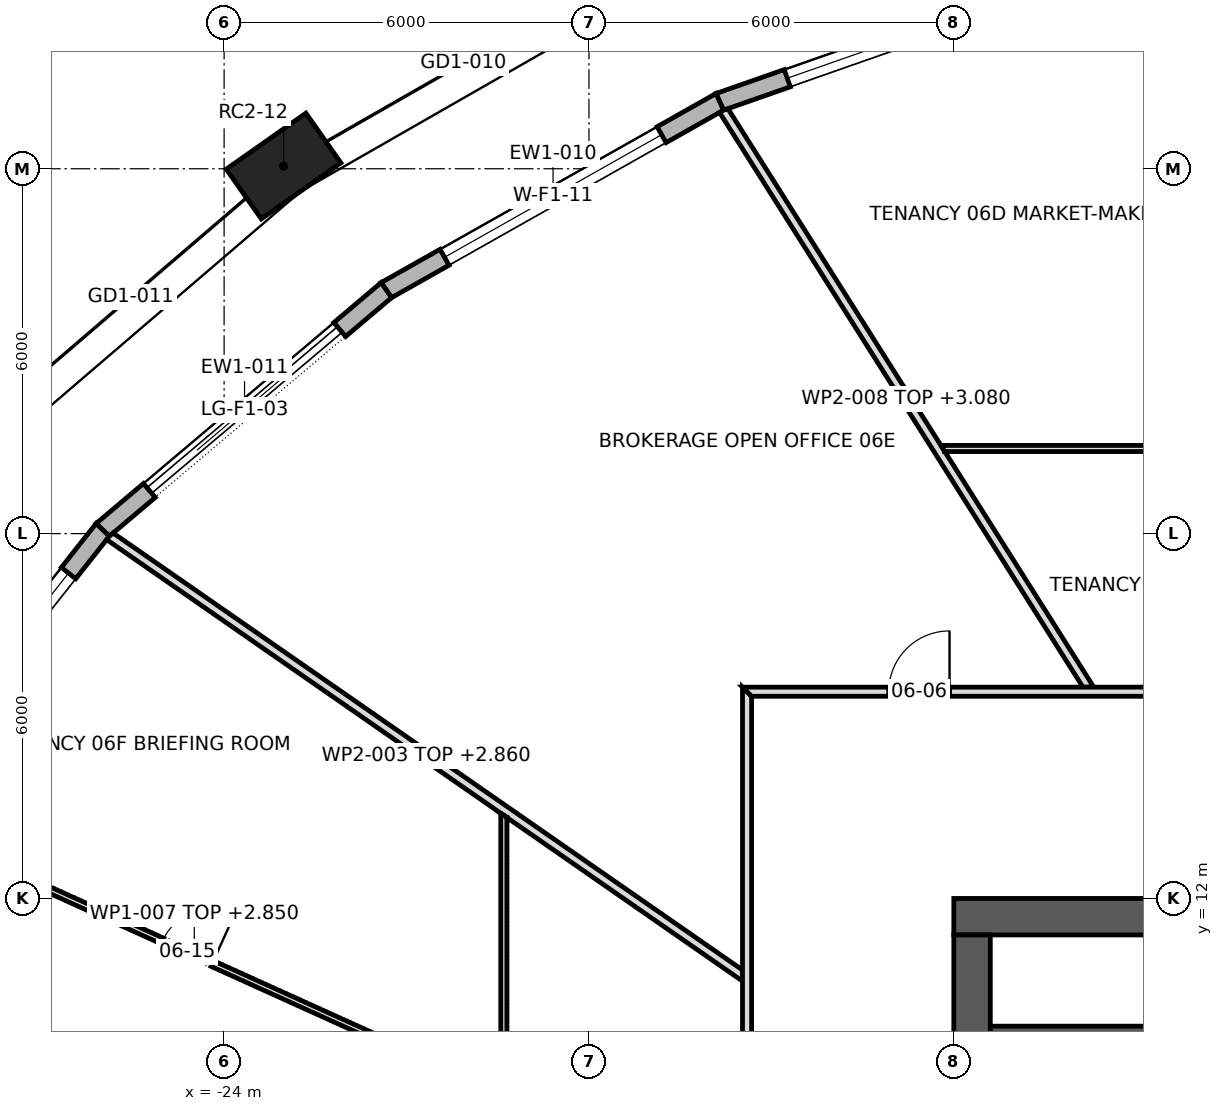
"""IFC4 building model, lengths in metres.
Left out: names, types, materials, properties, quantities, classifications, styles, units other than length and angle.
Written with IfcOpenShell. Run it as: python <this file> out.ifc"""

import sys

from ifc_helpers import new_model, si_unit, direction, frame, frame_2d, origin, origin_2d, place, context, subcontext, project, spatial, polyline, rectangle, outline, extrude, element, fill, save


model = new_model("IFC4")
c1 = context("Model", 3, precision=1e-05, world=origin(), true_north=direction((0.0, 1.0)))
c2 = subcontext(c1, "Body", "Model", "MODEL_VIEW")
j1 = project(units=[si_unit("LENGTHUNIT", "METRE"), si_unit("PLANEANGLEUNIT", "RADIAN")], contexts=[c1])
p1 = place(None, origin())
s1 = spatial("IfcSite", under=j1, at=p1, CompositionType="ELEMENT")
p2 = place(p1, origin())
s2 = spatial("IfcBuilding", under=s1, at=p2, CompositionType="ELEMENT")
p3 = place(p2, frame((0.0, 0.0, 86.5)))
s3 = spatial("IfcBuildingStorey", under=s2, at=p3, CompositionType="ELEMENT", Elevation=86.5)
p4 = place(p3, frame((-23.022, 24.045, 0.0), z_axis=(0.0, 0.0, 1.0), x_axis=(-0.817908788019, -0.57534790734, 0.0)))
e1 = element("IfcColumn", 1, at=p4, inside=s3, PredefinedType="COLUMN", context=c2, shape_type="SweptSolid", body=[
    extrude(rectangle(XDim=1.6, YDim=1.0, at=origin_2d()), origin(), (0.0, 0.0, 1.0), 4.2),
])
p5 = place(p3, frame((-12.0, 11.7, 0.0), z_axis=(0.0, 0.0, 1.0), x_axis=(1.0, 0.0, 0.0)))
e2 = element("IfcWall", 2, at=p5, inside=s3, PredefinedType="SHEAR", context=c2, shape_type="SweptSolid", body=[
    extrude(rectangle(XDim=24.0, YDim=0.6, at=frame_2d((12.0, 0.0))), origin(), (0.0, 0.0, 1.0), 4.2),
])
p6 = place(p5, frame((9.225, 0.0, 0.0)))
e3 = element("IfcOpeningElement", 3, at=p6, cuts=e2, PredefinedType="OPENING", context=c2, shape_type="SweptSolid", body=[
    extrude(rectangle(XDim=0.9, YDim=2.1, at=frame_2d((0.45, 1.05))), frame((0.0, 0.312, 0.0), z_axis=(0.0, -1.0, 0.0), x_axis=(1.0, 0.0, 0.0)), (0.0, 0.0, 1.0), 0.624),
])
p7 = place(p5, frame((10.925, 0.0, 0.0)))
e4 = element("IfcOpeningElement", 4, at=p7, cuts=e2, PredefinedType="OPENING", context=c2, shape_type="SweptSolid", body=[
    extrude(rectangle(XDim=0.8, YDim=2.1, at=frame_2d((0.4, 1.05))), frame((0.0, 0.312, 0.0), z_axis=(0.0, -1.0, 0.0), x_axis=(1.0, 0.0, 0.0)), (0.0, 0.0, 1.0), 0.624),
])
p8 = place(p5, frame((4.2, 0.0, 0.0)))
e5 = element("IfcOpeningElement", 5, at=p8, cuts=e2, PredefinedType="OPENING", context=c2, shape_type="SweptSolid", body=[
    extrude(rectangle(XDim=0.8, YDim=2.1, at=frame_2d((0.4, 1.05))), frame((0.0, 0.312, 0.0), z_axis=(0.0, -1.0, 0.0), x_axis=(1.0, 0.0, 0.0)), (0.0, 0.0, 1.0), 0.624),
])
p9 = place(p5, frame((13.8, 0.0, 0.0)))
e6 = element("IfcOpeningElement", 6, at=p9, cuts=e2, PredefinedType="OPENING", context=c2, shape_type="SweptSolid", body=[
    extrude(rectangle(XDim=0.8, YDim=2.1, at=frame_2d((0.4, 1.05))), frame((0.0, 0.312, 0.0), z_axis=(0.0, -1.0, 0.0), x_axis=(1.0, 0.0, 0.0)), (0.0, 0.0, 1.0), 0.624),
])
p10 = place(p5, frame((16.6, 0.0, 0.0)))
e7 = element("IfcOpeningElement", 7, at=p10, cuts=e2, PredefinedType="OPENING", context=c2, shape_type="SweptSolid", body=[
    extrude(rectangle(XDim=0.8, YDim=2.1, at=frame_2d((0.4, 1.05))), frame((0.0, 0.312, 0.0), z_axis=(0.0, -1.0, 0.0), x_axis=(1.0, 0.0, 0.0)), (0.0, 0.0, 1.0), 0.624),
])
p11 = place(p3, frame((-11.7, -11.4, 0.0), z_axis=(0.0, 0.0, 1.0), x_axis=(0.0, 1.0, 0.0)))
e8 = element("IfcWall", 8, at=p11, inside=s3, PredefinedType="SHEAR", context=c2, shape_type="SweptSolid", body=[
    extrude(rectangle(XDim=22.8, YDim=0.6, at=frame_2d((11.4, 0.0))), origin(), (0.0, 0.0, 1.0), 4.2),
])
p12 = place(p11, frame((10.2, 0.0, 0.0)))
e9 = element("IfcOpeningElement", 9, at=p12, cuts=e8, PredefinedType="OPENING", context=c2, shape_type="SweptSolid", body=[
    extrude(rectangle(XDim=2.4, YDim=2.1, at=frame_2d((1.2, 1.05))), frame((0.0, 0.312, 0.0), z_axis=(0.0, -1.0, 0.0), x_axis=(1.0, 0.0, 0.0)), (0.0, 0.0, 1.0), 0.624),
])
p13 = place(p11, frame((18.925, 0.0, 0.0)))
e10 = element("IfcOpeningElement", 10, at=p13, cuts=e8, PredefinedType="OPENING", context=c2, shape_type="SweptSolid", body=[
    extrude(rectangle(XDim=1.2, YDim=2.1, at=frame_2d((0.6, 1.05))), frame((0.0, 0.312, 0.0), z_axis=(0.0, -1.0, 0.0), x_axis=(1.0, 0.0, 0.0)), (0.0, 0.0, 1.0), 0.624),
])
p14 = place(p11, frame((2.675, 0.0, 0.0)))
e11 = element("IfcOpeningElement", 11, at=p14, cuts=e8, PredefinedType="OPENING", context=c2, shape_type="SweptSolid", body=[
    extrude(rectangle(XDim=1.2, YDim=2.1, at=frame_2d((0.6, 1.05))), frame((0.0, 0.312, 0.0), z_axis=(0.0, -1.0, 0.0), x_axis=(1.0, 0.0, 0.0)), (0.0, 0.0, 1.0), 0.624),
])
p15 = place(p3, frame((-9.759, 27.232, 0.0), z_axis=(0.0, 0.0, 1.0), x_axis=(-0.943820008365, -0.330459970057, 0.0)))
e12 = element("IfcWall", 12, at=p15, inside=s3, PredefinedType="STANDARD", context=c2, shape_type="SweptSolid", body=[
    extrude(outline(polyline([(-0.013, -0.15), (6.466, -0.15), (6.439, 0.15), (0.013, 0.15), (-0.013, -0.15)])), origin(), (0.0, 0.0, 1.0), 3.9),
])
p16 = place(p15, frame((1.176, 0.0, 0.6)))
e13 = element("IfcOpeningElement", 13, at=p16, cuts=e12, PredefinedType="OPENING", context=c2, shape_type="SweptSolid", body=[
    extrude(rectangle(XDim=4.1, YDim=2.85, at=frame_2d((2.05, 1.425))), frame((0.0, 0.162, 0.0), z_axis=(0.0, -1.0, 0.0), x_axis=(1.0, 0.0, 0.0)), (0.0, 0.0, 1.0), 0.324),
])
p17 = place(p3, frame((-15.849, 25.1, 0.0), z_axis=(0.0, 0.0, 1.0), x_axis=(-0.870737550302, -0.491748023376, 0.0)))
e14 = element("IfcWall", 14, at=p17, inside=s3, PredefinedType="STANDARD", context=c2, shape_type="SweptSolid", body=[
    extrude(outline(polyline([(-0.013, -0.15), (6.311, -0.15), (6.282, 0.15), (0.013, 0.15), (-0.013, -0.15)])), origin(), (0.0, 0.0, 1.0), 3.9),
])
p18 = place(p17, frame((1.098, 0.0, 0.6)))
e15 = element("IfcOpeningElement", 15, at=p18, cuts=e14, PredefinedType="OPENING", context=c2, shape_type="SweptSolid", body=[
    extrude(rectangle(XDim=4.1, YDim=2.85, at=frame_2d((2.05, 1.425))), frame((0.0, 0.162, 0.0), z_axis=(0.0, -1.0, 0.0), x_axis=(1.0, 0.0, 0.0)), (0.0, 0.0, 1.0), 0.324),
])
p19 = place(p3, frame((-21.332, 22.004, 0.0), z_axis=(0.0, 0.0, 1.0), x_axis=(-0.763753100684, -0.645508482667, 0.0)))
e16 = element("IfcWall", 16, at=p19, inside=s3, PredefinedType="STANDARD", context=c2, shape_type="SweptSolid", body=[
    extrude(outline(polyline([(-0.014, -0.15), (6.123, -0.15), (6.092, 0.15), (0.014, 0.15), (-0.014, -0.15)])), origin(), (0.0, 0.0, 1.0), 3.9),
])
p20 = place(p19, frame((1.004, 0.0, 0.0)))
e17 = element("IfcOpeningElement", 17, at=p20, cuts=e16, PredefinedType="OPENING", context=c2, shape_type="SweptSolid", body=[
    extrude(rectangle(XDim=4.1, YDim=3.45, at=frame_2d((2.05, 1.725))), frame((0.0, 0.162, 0.0), z_axis=(0.0, -1.0, 0.0), x_axis=(1.0, 0.0, 0.0)), (0.0, 0.0, 1.0), 0.324),
])
p21 = place(p3, frame((-25.996, 18.062, 0.0), z_axis=(0.0, 0.0, 1.0), x_axis=(-0.620142219764, -0.784489405452, 0.0)))
e18 = element("IfcWall", 18, at=p21, inside=s3, PredefinedType="STANDARD", context=c2, shape_type="SweptSolid", body=[
    extrude(outline(polyline([(-0.015, -0.15), (5.928, -0.15), (5.896, 0.15), (0.015, 0.15), (-0.015, -0.15)])), origin(), (0.0, 0.0, 1.0), 3.9),
])
p22 = place(p21, frame((0.906, 0.0, 0.6)))
e19 = element("IfcOpeningElement", 19, at=p22, cuts=e18, PredefinedType="OPENING", context=c2, shape_type="SweptSolid", body=[
    extrude(rectangle(XDim=4.1, YDim=2.85, at=frame_2d((2.05, 1.425))), frame((0.0, 0.162, 0.0), z_axis=(0.0, -1.0, 0.0), x_axis=(1.0, 0.0, 0.0)), (0.0, 0.0, 1.0), 0.324),
])
p23 = place(p3, frame((-11.4, 9.825, 0.0), z_axis=(0.0, 0.0, 1.0), x_axis=(1.0, 0.0, 0.0)))
e20 = element("IfcWall", 20, at=p23, inside=s3, PredefinedType="SHEAR", context=c2, shape_type="SweptSolid", body=[
    extrude(rectangle(XDim=8.0, YDim=0.15, at=frame_2d((4.0, 0.0))), origin(), (0.0, 0.0, 1.0), 3.9),
])
p24 = place(p3, frame((-25.888, 17.962, 0.0), z_axis=(0.0, 0.0, 1.0), x_axis=(0.821411896375, -0.570335424547, 0.0)))
e21 = element("IfcWall", 21, at=p24, inside=s3, PredefinedType="PARTITIONING", context=c2, shape_type="SweptSolid", body=[
    extrude(outline(polyline([(0.0, -0.075), (1.601, -0.075), (3.202, -0.075), (4.803, -0.075), (6.405, -0.075), (8.006, -0.075), (8.01, -0.072), (8.012, -0.075), (9.584, -0.075), (11.157, -0.075), (12.729, -0.075), (12.729, -0.074), (12.679, -0.002), (12.679, -0.002), (12.625, 0.075), (10.825, 0.075), (9.025, 0.075), (7.225, 0.075), (5.425, 0.075), (3.625, 0.075), (1.825, 0.075), (0.025, 0.075), (0.004, -0.004), (0.0, -0.067), (0.0, -0.075)])), origin(), (0.0, 0.0, 1.0), 2.86),
])
p25 = place(p3, frame((-19.4, -1.542, 0.0), z_axis=(0.0, 0.0, 1.0), x_axis=(0.0, 1.0, 0.0)))
e22 = element("IfcWall", 22, at=p25, inside=s3, PredefinedType="PARTITIONING", context=c2, shape_type="SweptSolid", body=[
    extrude(outline(polyline([(0.008, -0.05), (1.866, -0.05), (3.724, -0.05), (5.582, -0.05), (7.441, -0.05), (9.299, -0.05), (11.157, -0.05), (13.015, -0.05), (14.873, -0.05), (14.927, 0.028), (14.927, 0.027), (14.942, 0.05), (14.942, 0.05), (13.421, 0.05), (11.9, 0.05), (10.379, 0.05), (10.378, 0.048), (10.374, 0.05), (8.645, 0.05), (6.916, 0.05), (5.187, 0.05), (3.458, 0.05), (1.729, 0.05), (0.0, 0.05), (0.0, 0.045), (0.008, -0.05)])), origin(), (0.0, 0.0, 1.0), 3.9),
])
p26 = place(p25, frame((4.667, 0.0, 0.0)))
e23 = element("IfcOpeningElement", 23, at=p26, cuts=e22, PredefinedType="OPENING", context=c2, shape_type="SweptSolid", body=[
    extrude(rectangle(XDim=0.9, YDim=2.1, at=frame_2d((0.45, 1.05))), frame((0.0, 0.062, 0.0), z_axis=(0.0, -1.0, 0.0), x_axis=(1.0, 0.0, 0.0)), (0.0, 0.0, 1.0), 0.124),
])
p27 = place(p3, frame((-19.43, 8.773, 0.0), z_axis=(0.0, 0.0, 1.0), x_axis=(-0.911086470292, 0.412215287987, 0.0)))
e24 = element("IfcWall", 24, at=p27, inside=s3, PredefinedType="PARTITIONING", context=c2, shape_type="SweptSolid", body=[
    extrude(outline(polyline([(0.045, -0.05), (1.884, -0.05), (3.722, -0.05), (5.561, -0.05), (7.4, -0.05), (9.239, -0.05), (11.077, -0.05), (11.091, 0.002), (11.092, 0.05), (9.243, 0.05), (7.395, 0.05), (5.546, 0.05), (3.697, 0.05), (1.849, 0.05), (0.0, 0.05), (0.0, 0.049), (0.045, -0.05)])), origin(), (0.0, 0.0, 1.0), 2.85),
])
p28 = place(p27, frame((5.23, 0.0, 0.0)))
e25 = element("IfcOpeningElement", 25, at=p28, cuts=e24, PredefinedType="OPENING", context=c2, shape_type="SweptSolid", body=[
    extrude(rectangle(XDim=0.9, YDim=2.1, at=frame_2d((0.45, 1.05))), frame((0.0, 0.062, 0.0), z_axis=(0.0, -1.0, 0.0), x_axis=(1.0, 0.0, 0.0)), (0.0, 0.0, 1.0), 0.124),
])
p29 = place(p3, frame((-15.789, 24.966, 0.0), z_axis=(0.0, 0.0, 1.0), x_axis=(0.53447919721, -0.845181630036, 0.0)))
e26 = element("IfcWall", 26, at=p29, inside=s3, PredefinedType="PARTITIONING", context=c2, shape_type="SweptSolid", body=[
    extrude(outline(polyline([(0.0, -0.075), (1.864, -0.075), (3.727, -0.075), (5.591, -0.075), (7.455, -0.075), (9.318, -0.075), (11.182, -0.075), (11.277, 0.075), (11.277, 0.075), (9.748, 0.075), (8.22, 0.075), (6.692, 0.075), (6.69, 0.072), (6.686, 0.075), (5.02, 0.075), (3.353, 0.075), (1.687, 0.075), (0.021, 0.075), (0.004, 0.001), (0.0, -0.073), (0.0, -0.075)])), origin(), (0.0, 0.0, 1.0), 3.08),
])
p30 = place(p3, frame((-15.4, -15.475, 0.0), z_axis=(0.0, 0.0, 1.0), x_axis=(0.0, 1.0, 0.0)))
e27 = element("IfcWall", 27, at=p30, inside=s3, PredefinedType="PARTITIONING", context=c2, shape_type="SweptSolid", body=[
    extrude(outline(polyline([(0.15, -0.075), (2.066, -0.075), (3.981, -0.075), (5.897, -0.075), (7.812, -0.075), (9.728, -0.075), (11.644, -0.075), (13.56, -0.075), (15.475, -0.075), (17.391, -0.075), (19.306, -0.075), (21.222, -0.075), (23.138, -0.075), (25.053, -0.075), (26.969, -0.075), (28.885, -0.075), (30.8, -0.075), (30.95, 0.075), (29.016, 0.075), (27.081, 0.075), (25.147, 0.075), (23.212, 0.075), (21.278, 0.075), (19.344, 0.075), (17.409, 0.075), (15.475, 0.075), (13.541, 0.075), (11.606, 0.075), (9.672, 0.075), (7.738, 0.075), (5.803, 0.075), (3.869, 0.075), (1.935, 0.075), (0.0, 0.075), (0.15, -0.075)])), origin(), (0.0, 0.0, 1.0), 3.9),
])
p31 = place(p30, frame((19.675, 0.0, 0.0)))
e28 = element("IfcOpeningElement", 28, at=p31, cuts=e27, PredefinedType="OPENING", context=c2, shape_type="SweptSolid", body=[
    extrude(rectangle(XDim=1.0, YDim=2.1, at=frame_2d((0.5, 1.05))), frame((0.0, 0.087, 0.0), z_axis=(0.0, -1.0, 0.0), x_axis=(1.0, 0.0, 0.0)), (0.0, 0.0, 1.0), 0.174),
])
p32 = place(p30, frame((10.855, 0.0, 0.0)))
e29 = element("IfcOpeningElement", 29, at=p32, cuts=e27, PredefinedType="OPENING", context=c2, shape_type="SweptSolid", body=[
    extrude(rectangle(XDim=1.0, YDim=2.1, at=frame_2d((0.5, 1.05))), frame((0.0, 0.087, 0.0), z_axis=(0.0, -1.0, 0.0), x_axis=(1.0, 0.0, 0.0)), (0.0, 0.0, 1.0), 0.174),
])
p33 = place(p3, frame((-15.475, 15.4, 0.0), z_axis=(0.0, 0.0, 1.0), x_axis=(1.0, 0.0, 0.0)))
e30 = element("IfcWall", 30, at=p33, inside=s3, PredefinedType="PARTITIONING", context=c2, shape_type="SweptSolid", body=[
    extrude(outline(polyline([(0.15, -0.075), (2.066, -0.075), (3.981, -0.075), (5.897, -0.075), (7.812, -0.075), (9.728, -0.075), (11.644, -0.075), (13.56, -0.075), (15.475, -0.075), (17.391, -0.075), (19.306, -0.075), (21.222, -0.075), (23.138, -0.075), (25.053, -0.075), (26.969, -0.075), (28.885, -0.075), (30.8, -0.075), (30.95, 0.075), (29.016, 0.075), (27.081, 0.075), (25.147, 0.075), (23.212, 0.075), (21.278, 0.075), (19.344, 0.075), (17.409, 0.075), (15.475, 0.075), (13.541, 0.075), (11.606, 0.075), (9.672, 0.075), (7.738, 0.075), (5.803, 0.075), (3.869, 0.075), (1.935, 0.075), (0.0, 0.075), (0.15, -0.075)])), origin(), (0.0, 0.0, 1.0), 3.9),
])
p34 = place(p33, frame((21.155, 0.0, 0.0)))
e31 = element("IfcOpeningElement", 31, at=p34, cuts=e30, PredefinedType="OPENING", context=c2, shape_type="SweptSolid", body=[
    extrude(rectangle(XDim=1.8, YDim=2.1, at=frame_2d((0.9, 1.05))), frame((0.0, 0.087, 0.0), z_axis=(0.0, -1.0, 0.0), x_axis=(1.0, 0.0, 0.0)), (0.0, 0.0, 1.0), 0.174),
])
p35 = place(p33, frame((9.21, 0.0, 0.0)))
e32 = element("IfcOpeningElement", 32, at=p35, cuts=e30, PredefinedType="OPENING", context=c2, shape_type="SweptSolid", body=[
    extrude(rectangle(XDim=1.0, YDim=2.1, at=frame_2d((0.5, 1.05))), frame((0.0, 0.087, 0.0), z_axis=(0.0, -1.0, 0.0), x_axis=(1.0, 0.0, 0.0)), (0.0, 0.0, 1.0), 0.174),
])
p36 = place(p33, frame((2.405, 0.0, 0.0)))
e33 = element("IfcOpeningElement", 33, at=p36, cuts=e30, PredefinedType="OPENING", context=c2, shape_type="SweptSolid", body=[
    extrude(rectangle(XDim=1.0, YDim=2.1, at=frame_2d((0.5, 1.05))), frame((0.0, 0.087, 0.0), z_axis=(0.0, -1.0, 0.0), x_axis=(1.0, 0.0, 0.0)), (0.0, 0.0, 1.0), 0.174),
])
p37 = place(p3, frame((-12.212, 19.4, 0.0), z_axis=(0.0, 0.0, 1.0), x_axis=(1.0, 0.0, 0.0)))
e34 = element("IfcWall", 34, at=p37, inside=s3, PredefinedType="PARTITIONING", context=c2, shape_type="SweptSolid", body=[
    extrude(outline(polyline([(9.882, -0.05), (9.882, -0.047), (9.871, 0.05), (7.896, 0.05), (5.922, 0.05), (3.948, 0.05), (1.974, 0.05), (0.0, 0.05), (0.0, 0.049), (0.063, -0.05), (2.027, -0.05), (3.99, -0.05), (5.954, -0.05), (7.918, -0.05), (9.882, -0.05)])), origin(), (0.0, 0.0, 1.0), 3.9),
])
p38 = place(p37, frame((4.497, 0.0, 0.0)))
e35 = element("IfcOpeningElement", 35, at=p38, cuts=e34, PredefinedType="OPENING", context=c2, shape_type="SweptSolid", body=[
    extrude(rectangle(XDim=0.9, YDim=2.1, at=frame_2d((0.45, 1.05))), frame((0.0, 0.062, 0.0), z_axis=(0.0, -1.0, 0.0), x_axis=(1.0, 0.0, 0.0)), (0.0, 0.0, 1.0), 0.124),
])
p39 = place(p16, origin())
e36 = element("IfcWindow", 36, at=p39, inside=s3, PartitioningType="TRIPLE_PANEL_VERTICAL", PredefinedType="WINDOW", context=c2, shape_type="SweptSolid", body=[
    extrude(rectangle(XDim=4.1, YDim=2.85, at=frame_2d((2.05, 1.425))), frame((0.0, 0.03, 0.0), z_axis=(0.0, -1.0, 0.0), x_axis=(1.0, 0.0, 0.0)), (0.0, 0.0, 1.0), 0.06),
])
fill(e13, e36)
p40 = place(p18, origin())
e37 = element("IfcWindow", 37, at=p40, inside=s3, PartitioningType="TRIPLE_PANEL_VERTICAL", PredefinedType="WINDOW", context=c2, shape_type="SweptSolid", body=[
    extrude(rectangle(XDim=4.1, YDim=2.85, at=frame_2d((2.05, 1.425))), frame((0.0, 0.03, 0.0), z_axis=(0.0, -1.0, 0.0), x_axis=(1.0, 0.0, 0.0)), (0.0, 0.0, 1.0), 0.06),
])
fill(e15, e37)
p41 = place(p20, origin())
e38 = element("IfcDoor", 38, at=p41, inside=s3, OperationType="DOUBLE_DOOR_SLIDING", PredefinedType="DOOR", context=c2, shape_type="SweptSolid", body=[
    extrude(rectangle(XDim=4.1, YDim=3.45, at=frame_2d((2.05, 1.725))), frame((0.0, 0.025, 0.0), z_axis=(0.0, -1.0, 0.0), x_axis=(1.0, 0.0, 0.0)), (0.0, 0.0, 1.0), 0.05),
])
fill(e17, e38)
p42 = place(p22, origin())
e39 = element("IfcWindow", 39, at=p42, inside=s3, PartitioningType="TRIPLE_PANEL_VERTICAL", PredefinedType="WINDOW", context=c2, shape_type="SweptSolid", body=[
    extrude(rectangle(XDim=4.1, YDim=2.85, at=frame_2d((2.05, 1.425))), frame((0.0, 0.03, 0.0), z_axis=(0.0, -1.0, 0.0), x_axis=(1.0, 0.0, 0.0)), (0.0, 0.0, 1.0), 0.06),
])
fill(e19, e39)
p43 = place(p36, origin())
e40 = element("IfcDoor", 40, at=p43, inside=s3, OperationType="SINGLE_SWING_LEFT", PredefinedType="DOOR", context=c2, shape_type="SweptSolid", body=[
    extrude(rectangle(XDim=1.0, YDim=2.1, at=frame_2d((0.5, 1.05))), frame((0.0, 0.025, 0.0), z_axis=(0.0, -1.0, 0.0), x_axis=(1.0, 0.0, 0.0)), (0.0, 0.0, 1.0), 0.05),
])
fill(e33, e40)
p44 = place(p28, frame((0.9, 0.0, 0.0), z_axis=(0.0, 0.0, 1.0), x_axis=(-1.0, 0.0, 0.0)))
e41 = element("IfcDoor", 41, at=p44, inside=s3, OperationType="SINGLE_SWING_LEFT", PredefinedType="DOOR", context=c2, shape_type="SweptSolid", body=[
    extrude(rectangle(XDim=0.9, YDim=2.1, at=frame_2d((0.45, 1.05))), frame((0.0, 0.025, 0.0), z_axis=(0.0, -1.0, 0.0), x_axis=(1.0, 0.0, 0.0)), (0.0, 0.0, 1.0), 0.05),
])
fill(e25, e41)
save(model, sys.argv[1])
